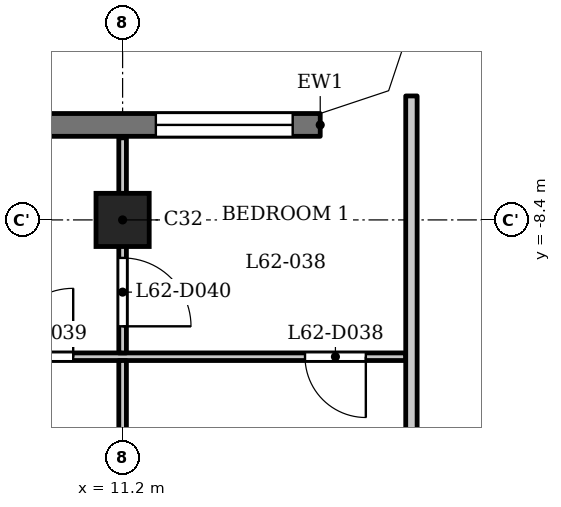
"""IFC4 building model, lengths in metres.
Left out: names, types, materials, properties, quantities, classifications, styles, units other than length and angle.
Written with IfcOpenShell. Run it as: python <this file> out.ifc"""

import sys

from ifc_helpers import new_model, si_unit, direction, frame, frame_2d, origin, origin_2d, place, context, subcontext, project, spatial, polyline, rectangle, outline, extrude, element, fill, save


model = new_model("IFC4")
c1 = context("Model", 3, precision=1e-05, world=origin(), true_north=direction((0.0, 1.0)))
c2 = subcontext(c1, "Body", "Model", "MODEL_VIEW")
j1 = project(units=[si_unit("LENGTHUNIT", "METRE"), si_unit("PLANEANGLEUNIT", "RADIAN")], contexts=[c1])
p1 = place(None, origin())
s1 = spatial("IfcSite", under=j1, at=p1, CompositionType="ELEMENT")
p2 = place(p1, origin())
s2 = spatial("IfcBuilding", under=s1, at=p2, CompositionType="ELEMENT")
p3 = place(p2, frame((0.0, 0.0, 241.7)))
s3 = spatial("IfcBuildingStorey", under=s2, at=p3, CompositionType="ELEMENT", Elevation=241.7)
p4 = place(p3, frame((11.2, -8.4, 0.0), z_axis=(0.0, 0.0, 1.0), x_axis=(1.0, 0.0, 0.0)))
e1 = element("IfcColumn", 1, at=p4, inside=s3, PredefinedType="COLUMN", context=c2, shape_type="SweptSolid", body=[
    extrude(rectangle(XDim=0.7, YDim=0.7, at=origin_2d()), origin(), (0.0, 0.0, 1.0), 3.5),
])
p5 = place(p3, frame((13.8, -7.15, 0.0), z_axis=(0.0, 0.0, 1.0), x_axis=(-1.0, 0.0, 0.0)))
e2 = element("IfcWall", 2, at=p5, inside=s3, PredefinedType="SOLIDWALL", context=c2, shape_type="SweptSolid", body=[
    extrude(rectangle(XDim=27.6, YDim=0.3, at=frame_2d((13.8, 0.0))), origin(), (0.0, 0.0, 1.0), 3.2),
])
p6 = place(p5, frame((0.363, 0.0, 0.9)))
e3 = element("IfcOpeningElement", 3, at=p6, cuts=e2, PredefinedType="OPENING", context=c2, shape_type="SweptSolid", body=[
    extrude(rectangle(XDim=1.8, YDim=1.25, at=frame_2d((0.9, 0.625))), frame((0.0, 0.16, 0.0), z_axis=(0.0, -1.0, 0.0), x_axis=(1.0, 0.0, 0.0)), (0.0, 0.0, 1.0), 0.32),
])
p7 = place(p5, frame((3.6, 0.0, 1.2)))
e4 = element("IfcOpeningElement", 4, at=p7, cuts=e2, PredefinedType="OPENING", context=c2, shape_type="SweptSolid", body=[
    extrude(rectangle(XDim=3.6, YDim=0.95, at=frame_2d((1.8, 0.475))), frame((0.0, 0.16, 0.0), z_axis=(0.0, -1.0, 0.0), x_axis=(1.0, 0.0, 0.0)), (0.0, 0.0, 1.0), 0.32),
])
p8 = place(p5, frame((9.2, 0.0, 1.2)))
e5 = element("IfcOpeningElement", 5, at=p8, cuts=e2, PredefinedType="OPENING", context=c2, shape_type="SweptSolid", body=[
    extrude(rectangle(XDim=3.6, YDim=0.95, at=frame_2d((1.8, 0.475))), frame((0.0, 0.16, 0.0), z_axis=(0.0, -1.0, 0.0), x_axis=(1.0, 0.0, 0.0)), (0.0, 0.0, 1.0), 0.32),
])
p9 = place(p5, frame((14.8, 0.0, 1.2)))
e6 = element("IfcOpeningElement", 6, at=p9, cuts=e2, PredefinedType="OPENING", context=c2, shape_type="SweptSolid", body=[
    extrude(rectangle(XDim=3.6, YDim=0.95, at=frame_2d((1.8, 0.475))), frame((0.0, 0.16, 0.0), z_axis=(0.0, -1.0, 0.0), x_axis=(1.0, 0.0, 0.0)), (0.0, 0.0, 1.0), 0.32),
])
p10 = place(p5, frame((20.4, 0.0, 1.2)))
e7 = element("IfcOpeningElement", 7, at=p10, cuts=e2, PredefinedType="OPENING", context=c2, shape_type="SweptSolid", body=[
    extrude(rectangle(XDim=3.6, YDim=0.95, at=frame_2d((1.8, 0.475))), frame((0.0, 0.16, 0.0), z_axis=(0.0, -1.0, 0.0), x_axis=(1.0, 0.0, 0.0)), (0.0, 0.0, 1.0), 0.32),
])
p11 = place(p5, frame((25.438, 0.0, 0.9)))
e8 = element("IfcOpeningElement", 8, at=p11, cuts=e2, PredefinedType="OPENING", context=c2, shape_type="SweptSolid", body=[
    extrude(rectangle(XDim=1.8, YDim=1.25, at=frame_2d((0.9, 0.625))), frame((0.0, 0.16, 0.0), z_axis=(0.0, -1.0, 0.0), x_axis=(1.0, 0.0, 0.0)), (0.0, 0.0, 1.0), 0.32),
])
p12 = place(p3, frame((-14.925, -10.2, 0.0), z_axis=(0.0, 0.0, 1.0), x_axis=(1.0, 0.0, 0.0)))
e9 = element("IfcWall", 9, at=p12, inside=s3, PredefinedType="PARTITIONING", context=c2, shape_type="SweptSolid", body=[
    extrude(rectangle(XDim=29.85, YDim=0.1, at=frame_2d((14.925, 0.0))), origin(), (0.0, 0.0, 1.0), 3.2),
])
p13 = place(p12, frame((7.875, 0.0, 0.0)))
e10 = element("IfcOpeningElement", 10, at=p13, cuts=e9, PredefinedType="OPENING", context=c2, shape_type="SweptSolid", body=[
    extrude(rectangle(XDim=0.8, YDim=2.1, at=frame_2d((0.4, 1.05))), frame((0.0, 0.06, 0.0), z_axis=(0.0, -1.0, 0.0), x_axis=(1.0, 0.0, 0.0)), (0.0, 0.0, 1.0), 0.12),
])
p14 = place(p12, frame((2.175, 0.0, 0.0)))
e11 = element("IfcOpeningElement", 11, at=p14, cuts=e9, PredefinedType="OPENING", context=c2, shape_type="SweptSolid", body=[
    extrude(rectangle(XDim=0.9, YDim=2.1, at=frame_2d((0.45, 1.05))), frame((0.0, 0.06, 0.0), z_axis=(0.0, -1.0, 0.0), x_axis=(1.0, 0.0, 0.0)), (0.0, 0.0, 1.0), 0.12),
])
p15 = place(p12, frame((19.075, 0.0, 0.0)))
e12 = element("IfcOpeningElement", 12, at=p15, cuts=e9, PredefinedType="OPENING", context=c2, shape_type="SweptSolid", body=[
    extrude(rectangle(XDim=0.8, YDim=2.1, at=frame_2d((0.4, 1.05))), frame((0.0, 0.06, 0.0), z_axis=(0.0, -1.0, 0.0), x_axis=(1.0, 0.0, 0.0)), (0.0, 0.0, 1.0), 0.12),
])
p16 = place(p12, frame((13.375, 0.0, 0.0)))
e13 = element("IfcOpeningElement", 13, at=p16, cuts=e9, PredefinedType="OPENING", context=c2, shape_type="SweptSolid", body=[
    extrude(rectangle(XDim=0.9, YDim=2.1, at=frame_2d((0.45, 1.05))), frame((0.0, 0.06, 0.0), z_axis=(0.0, -1.0, 0.0), x_axis=(1.0, 0.0, 0.0)), (0.0, 0.0, 1.0), 0.12),
])
p17 = place(p12, frame((28.525, 0.0, 0.0)))
e14 = element("IfcOpeningElement", 14, at=p17, cuts=e9, PredefinedType="OPENING", context=c2, shape_type="SweptSolid", body=[
    extrude(rectangle(XDim=0.8, YDim=2.1, at=frame_2d((0.4, 1.05))), frame((0.0, 0.06, 0.0), z_axis=(0.0, -1.0, 0.0), x_axis=(1.0, 0.0, 0.0)), (0.0, 0.0, 1.0), 0.12),
])
p18 = place(p12, frame((24.575, 0.0, 0.0)))
e15 = element("IfcOpeningElement", 15, at=p18, cuts=e9, PredefinedType="OPENING", context=c2, shape_type="SweptSolid", body=[
    extrude(rectangle(XDim=0.9, YDim=2.1, at=frame_2d((0.45, 1.05))), frame((0.0, 0.06, 0.0), z_axis=(0.0, -1.0, 0.0), x_axis=(1.0, 0.0, 0.0)), (0.0, 0.0, 1.0), 0.12),
])
p19 = place(p3, frame((11.2, -13.725, 0.0), z_axis=(0.0, 0.0, 1.0), x_axis=(0.0, 1.0, 0.0)))
e16 = element("IfcWall", 16, at=p19, inside=s3, PredefinedType="PARTITIONING", context=c2, shape_type="SweptSolid", body=[
    extrude(rectangle(XDim=3.475, YDim=0.1, at=frame_2d((1.738, 0.0))), origin(), (0.0, 0.0, 1.0), 3.2),
])
p20 = place(p3, frame((11.2, -10.15, 0.0), z_axis=(0.0, 0.0, 1.0), x_axis=(0.0, 1.0, 0.0)))
e17 = element("IfcWall", 17, at=p20, inside=s3, PredefinedType="PARTITIONING", context=c2, shape_type="SweptSolid", body=[
    extrude(rectangle(XDim=2.83, YDim=0.1, at=frame_2d((1.415, 0.0))), origin(), (0.0, 0.0, 1.0), 3.2),
])
p21 = place(p20, frame((0.35, 0.0, 0.0)))
e18 = element("IfcOpeningElement", 18, at=p21, cuts=e17, PredefinedType="OPENING", context=c2, shape_type="SweptSolid", body=[
    extrude(rectangle(XDim=0.9, YDim=2.1, at=frame_2d((0.45, 1.05))), frame((0.0, 0.06, 0.0), z_axis=(0.0, -1.0, 0.0), x_axis=(1.0, 0.0, 0.0)), (0.0, 0.0, 1.0), 0.12),
])
p22 = place(p3, frame((15.0, -13.725, 0.0), z_axis=(0.0, 0.0, 1.0), x_axis=(0.0, 1.0, 0.0)))
e19 = element("IfcWall", 19, at=p22, inside=s3, PredefinedType="PARTITIONING", context=c2, shape_type="SweptSolid", body=[
    extrude(rectangle(XDim=6.956, YDim=0.15, at=frame_2d((3.478, 0.0))), origin(), (0.0, 0.0, 1.0), 3.2),
])
p23 = place(p3, origin())
e20 = element("IfcWall", 20, at=p23, inside=s3, PredefinedType="SOLIDWALL", context=c2, shape_type="SweptSolid", body=[
    extrude(outline(polyline([(14.937, -6.937), (15.3, -5.849), (15.3, -5.8), (15.0, -5.8), (14.7, -6.7), (13.8, -7.0), (13.8, -7.3), (13.849, -7.3), (14.937, -6.937)])), origin(), (0.0, 0.0, 1.0), 3.2),
])
p24 = place(p17, origin())
e21 = element("IfcDoor", 21, at=p24, inside=s3, OperationType="SINGLE_SWING_RIGHT", PredefinedType="DOOR", context=c2, shape_type="SweptSolid", body=[
    extrude(rectangle(XDim=0.8, YDim=2.1, at=frame_2d((0.4, 1.05))), frame((0.0, 0.025, 0.0), z_axis=(0.0, -1.0, 0.0), x_axis=(1.0, 0.0, 0.0)), (0.0, 0.0, 1.0), 0.05),
])
fill(e14, e21)
p25 = place(p18, origin())
e22 = element("IfcDoor", 22, at=p25, inside=s3, OperationType="SINGLE_SWING_LEFT", PredefinedType="DOOR", context=c2, shape_type="SweptSolid", body=[
    extrude(rectangle(XDim=0.9, YDim=2.1, at=frame_2d((0.45, 1.05))), frame((0.0, 0.025, 0.0), z_axis=(0.0, -1.0, 0.0), x_axis=(1.0, 0.0, 0.0)), (0.0, 0.0, 1.0), 0.05),
])
fill(e15, e22)
p26 = place(p21, origin())
e23 = element("IfcDoor", 23, at=p26, inside=s3, OperationType="SINGLE_SWING_LEFT", PredefinedType="DOOR", context=c2, shape_type="SweptSolid", body=[
    extrude(rectangle(XDim=0.9, YDim=2.1, at=frame_2d((0.45, 1.05))), frame((0.0, 0.025, 0.0), z_axis=(0.0, -1.0, 0.0), x_axis=(1.0, 0.0, 0.0)), (0.0, 0.0, 1.0), 0.05),
])
fill(e18, e23)
p27 = place(p6, origin())
e24 = element("IfcWindow", 24, at=p27, inside=s3, PartitioningType="SINGLE_PANEL", PredefinedType="WINDOW", context=c2, shape_type="SweptSolid", body=[
    extrude(rectangle(XDim=1.8, YDim=1.25, at=frame_2d((0.9, 0.625))), frame((0.0, 0.03, 0.0), z_axis=(0.0, -1.0, 0.0), x_axis=(1.0, 0.0, 0.0)), (0.0, 0.0, 1.0), 0.06),
])
fill(e3, e24)
save(model, sys.argv[1])
